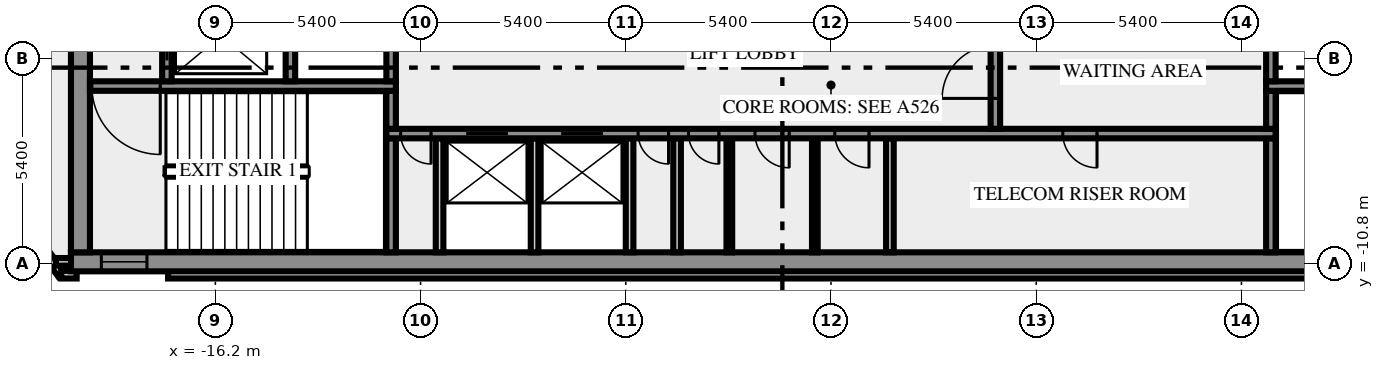
"""IFC4 building model, lengths in metres.
Left out: names, types, materials, properties, quantities, classifications, styles, units other than length and angle.
Written with IfcOpenShell. Run it as: python <this file> out.ifc"""

import sys

from ifc_helpers import new_model, si_unit, direction, frame, frame_2d, origin, place, context, subcontext, project, spatial, rectangle, extrude, element, fill, save


model = new_model("IFC4")
c1 = context("Model", 3, precision=1e-05, world=origin(), true_north=direction((0.0, 1.0)))
c2 = subcontext(c1, "Body", "Model", "MODEL_VIEW")
j1 = project(units=[si_unit("LENGTHUNIT", "METRE"), si_unit("PLANEANGLEUNIT", "RADIAN")], contexts=[c1])
p1 = place(None, origin())
s1 = spatial("IfcSite", under=j1, at=p1, CompositionType="ELEMENT")
p2 = place(p1, origin())
s2 = spatial("IfcBuilding", under=s1, at=p2, CompositionType="ELEMENT")
p3 = place(p2, frame((0.0, 0.0, 343.0)))
s3 = spatial("IfcBuildingStorey", under=s2, at=p3, CompositionType="ELEMENT", Elevation=343.0)
p4 = place(p3, frame((-21.833, -8.909, 0.0), z_axis=(0.0, 0.0, 1.0), x_axis=(0.587766567315, -0.809030569476, 0.0)))
e1 = element("IfcWall", 1, at=p4, inside=s3, PredefinedType="SOLIDWALL", context=c2, shape_type="SweptSolid", body=[
    extrude(rectangle(XDim=2.688, YDim=0.2, at=frame_2d((1.344, 0.0))), origin(), (0.0, 0.0, 1.0), 3.65),
])
p5 = place(p3, frame((-20.256, -11.088, 0.0), z_axis=(0.0, 0.0, 1.0), x_axis=(1.0, 0.0, 0.0)))
e2 = element("IfcWall", 2, at=p5, inside=s3, PredefinedType="SOLIDWALL", context=c2, shape_type="SweptSolid", body=[
    extrude(rectangle(XDim=0.406, YDim=0.2, at=frame_2d((0.203, 0.0))), origin(), (0.0, 0.0, 1.0), 3.65),
])
p6 = place(p3, frame((-17.444, -11.088, 0.0), z_axis=(0.0, 0.0, 1.0), x_axis=(1.0, 0.0, 0.0)))
e3 = element("IfcWall", 3, at=p6, inside=s3, PredefinedType="SOLIDWALL", context=c2, shape_type="SweptSolid", body=[
    extrude(rectangle(XDim=34.888, YDim=0.2, at=frame_2d((17.444, 0.0))), origin(), (0.0, 0.0, 1.0), 3.65),
])
p7 = place(p3, frame((-19.98, -10.75, 0.0), z_axis=(0.0, 0.0, 1.0), x_axis=(-1.0, 0.0, 0.0)))
e4 = element("IfcWall", 4, at=p7, inside=s3, PredefinedType="SOLIDWALL", context=c2, shape_type="SweptSolid", body=[
    extrude(rectangle(XDim=0.417, YDim=0.2, at=frame_2d((0.208, 0.0))), origin(), (0.0, 0.0, 1.0), 3.65),
])
p8 = place(p3, frame((-20.0, -10.75, 0.0), z_axis=(0.0, 0.0, 1.0), x_axis=(1.0, 0.0, 0.0)))
e5 = element("IfcWall", 5, at=p8, inside=s3, PredefinedType="SHEAR", context=c2, shape_type="SweptSolid", body=[
    extrude(rectangle(XDim=40.0, YDim=0.5, at=frame_2d((20.0, 0.0))), origin(), (0.0, 0.0, 1.0), 3.65),
])
p9 = place(p8, frame((0.8, 0.0, 1.0)))
e6 = element("IfcOpeningElement", 6, at=p9, cuts=e5, PredefinedType="OPENING", context=c2, shape_type="SweptSolid", body=[
    extrude(rectangle(XDim=1.2, YDim=1.2, at=frame_2d((0.6, 0.6))), frame((0.0, 0.26, 0.0), z_axis=(0.0, -1.0, 0.0), x_axis=(1.0, 0.0, 0.0)), (0.0, 0.0, 1.0), 0.52),
])
p10 = place(p8, frame((38.0, 0.0, 1.0)))
e7 = element("IfcOpeningElement", 7, at=p10, cuts=e5, PredefinedType="OPENING", context=c2, shape_type="SweptSolid", body=[
    extrude(rectangle(XDim=1.2, YDim=1.2, at=frame_2d((0.6, 0.6))), frame((0.0, 0.26, 0.0), z_axis=(0.0, -1.0, 0.0), x_axis=(1.0, 0.0, 0.0)), (0.0, 0.0, 1.0), 0.52),
])
p11 = place(p3, frame((-19.75, -10.5, 0.0), z_axis=(0.0, 0.0, 1.0), x_axis=(0.0, 1.0, 0.0)))
e8 = element("IfcWall", 8, at=p11, inside=s3, PredefinedType="SHEAR", context=c2, shape_type="SweptSolid", body=[
    extrude(rectangle(XDim=8.8, YDim=0.5, at=frame_2d((4.4, 0.0))), origin(), (0.0, 0.0, 1.0), 3.65),
])
p12 = place(p3, frame((-11.575, -10.5, 0.0), z_axis=(0.0, 0.0, 1.0), x_axis=(0.0, 1.0, 0.0)))
e9 = element("IfcWall", 9, at=p12, inside=s3, PredefinedType="SHEAR", context=c2, shape_type="SweptSolid", body=[
    extrude(rectangle(XDim=3.0, YDim=0.25, at=frame_2d((1.5, 0.0))), origin(), (0.0, 0.0, 1.0), 3.65),
])
for number, where, z_axis, x_axis in (
    (10, (-10.3, -10.5, 0.0), (0.0, 0.0, 1.0), (0.0, 1.0, 0.0)),
    (11, (-7.8, -10.5, 0.0), (0.0, 0.0, 1.0), (0.0, 1.0, 0.0)),
    (12, (-5.3, -10.5, 0.0), (0.0, 0.0, 1.0), (0.0, 1.0, 0.0)),
    (13, (-4.05, -10.5, 0.0), (0.0, 0.0, 1.0), (0.0, 1.0, 0.0)),
):
    element("IfcWall", number, at=place(p3, frame(where, z_axis=z_axis, x_axis=x_axis)), inside=s3, PredefinedType="SOLIDWALL", context=c2, shape_type="SweptSolid", body=[
        extrude(rectangle(XDim=3.0, YDim=0.2, at=frame_2d((1.5, 0.0))), origin(), (0.0, 0.0, 1.0), 3.65),
    ])
for number, where, z_axis, x_axis in (
    (14, (-2.675, -10.5, 0.0), (0.0, 0.0, 1.0), (0.0, 1.0, 0.0)),
    (15, (-0.425, -10.5, 0.0), (0.0, 0.0, 1.0), (0.0, 1.0, 0.0)),
):
    element("IfcWall", number, at=place(p3, frame(where, z_axis=z_axis, x_axis=x_axis)), inside=s3, PredefinedType="PARTITIONING", context=c2, shape_type="SweptSolid", body=[
        extrude(rectangle(XDim=3.0, YDim=0.15, at=frame_2d((1.5, 0.0))), origin(), (0.0, 0.0, 1.0), 3.65),
    ])
p13 = place(p3, frame((1.55, -10.5, 0.0), z_axis=(0.0, 0.0, 1.0), x_axis=(0.0, 1.0, 0.0)))
e16 = element("IfcWall", 16, at=p13, inside=s3, PredefinedType="SOLIDWALL", context=c2, shape_type="SweptSolid", body=[
    extrude(rectangle(XDim=3.0, YDim=0.2, at=frame_2d((1.5, 0.0))), origin(), (0.0, 0.0, 1.0), 3.65),
])
p14 = place(p3, frame((11.575, -10.5, 0.0), z_axis=(0.0, 0.0, 1.0), x_axis=(0.0, 1.0, 0.0)))
e17 = element("IfcWall", 17, at=p14, inside=s3, PredefinedType="SHEAR", context=c2, shape_type="SweptSolid", body=[
    extrude(rectangle(XDim=3.0, YDim=0.25, at=frame_2d((1.5, 0.0))), origin(), (0.0, 0.0, 1.0), 3.65),
])
p15 = place(p3, frame((11.7, -7.375, 0.0), z_axis=(0.0, 0.0, 1.0), x_axis=(-1.0, 0.0, 0.0)))
e18 = element("IfcWall", 18, at=p15, inside=s3, PredefinedType="SHEAR", context=c2, shape_type="SweptSolid", body=[
    extrude(rectangle(XDim=23.4, YDim=0.25, at=frame_2d((11.7, 0.0))), origin(), (0.0, 0.0, 1.0), 3.65),
])
p16 = place(p15, frame((22.225, 0.0, 0.0)))
e19 = element("IfcOpeningElement", 19, at=p16, cuts=e18, PredefinedType="OPENING", context=c2, shape_type="SweptSolid", body=[
    extrude(rectangle(XDim=0.8, YDim=2.1, at=frame_2d((0.4, 1.05))), frame((0.0, 0.135, 0.0), z_axis=(0.0, -1.0, 0.0), x_axis=(1.0, 0.0, 0.0)), (0.0, 0.0, 1.0), 0.27),
])
p17 = place(p15, frame((20.2, 0.0, 0.0)))
e20 = element("IfcOpeningElement", 20, at=p17, cuts=e18, PredefinedType="OPENING", context=c2, shape_type="SweptSolid", body=[
    extrude(rectangle(XDim=1.1, YDim=2.1, at=frame_2d((0.55, 1.05))), frame((0.0, 0.135, 0.0), z_axis=(0.0, -1.0, 0.0), x_axis=(1.0, 0.0, 0.0)), (0.0, 0.0, 1.0), 0.27),
])
p18 = place(p15, frame((17.7, 0.0, 0.0)))
e21 = element("IfcOpeningElement", 21, at=p18, cuts=e18, PredefinedType="OPENING", context=c2, shape_type="SweptSolid", body=[
    extrude(rectangle(XDim=1.1, YDim=2.1, at=frame_2d((0.55, 1.05))), frame((0.0, 0.135, 0.0), z_axis=(0.0, -1.0, 0.0), x_axis=(1.0, 0.0, 0.0)), (0.0, 0.0, 1.0), 0.27),
])
p19 = place(p15, frame((15.975, 0.0, 0.0)))
e22 = element("IfcOpeningElement", 22, at=p19, cuts=e18, PredefinedType="OPENING", context=c2, shape_type="SweptSolid", body=[
    extrude(rectangle(XDim=0.8, YDim=2.1, at=frame_2d((0.4, 1.05))), frame((0.0, 0.135, 0.0), z_axis=(0.0, -1.0, 0.0), x_axis=(1.0, 0.0, 0.0)), (0.0, 0.0, 1.0), 0.27),
])
p20 = place(p15, frame((14.65, 0.0, 0.0)))
e23 = element("IfcOpeningElement", 23, at=p20, cuts=e18, PredefinedType="OPENING", context=c2, shape_type="SweptSolid", body=[
    extrude(rectangle(XDim=0.8, YDim=2.1, at=frame_2d((0.4, 1.05))), frame((0.0, 0.135, 0.0), z_axis=(0.0, -1.0, 0.0), x_axis=(1.0, 0.0, 0.0)), (0.0, 0.0, 1.0), 0.27),
])
p21 = place(p15, frame((12.8, 0.0, 0.0)))
e24 = element("IfcOpeningElement", 24, at=p21, cuts=e18, PredefinedType="OPENING", context=c2, shape_type="SweptSolid", body=[
    extrude(rectangle(XDim=0.9, YDim=2.1, at=frame_2d((0.45, 1.05))), frame((0.0, 0.135, 0.0), z_axis=(0.0, -1.0, 0.0), x_axis=(1.0, 0.0, 0.0)), (0.0, 0.0, 1.0), 0.27),
])
p22 = place(p15, frame((10.7, 0.0, 0.0)))
e25 = element("IfcOpeningElement", 25, at=p22, cuts=e18, PredefinedType="OPENING", context=c2, shape_type="SweptSolid", body=[
    extrude(rectangle(XDim=0.9, YDim=2.1, at=frame_2d((0.45, 1.05))), frame((0.0, 0.135, 0.0), z_axis=(0.0, -1.0, 0.0), x_axis=(1.0, 0.0, 0.0)), (0.0, 0.0, 1.0), 0.27),
])
p23 = place(p15, frame((4.7, 0.0, 0.0)))
e26 = element("IfcOpeningElement", 26, at=p23, cuts=e18, PredefinedType="OPENING", context=c2, shape_type="SweptSolid", body=[
    extrude(rectangle(XDim=0.9, YDim=2.1, at=frame_2d((0.45, 1.05))), frame((0.0, 0.135, 0.0), z_axis=(0.0, -1.0, 0.0), x_axis=(1.0, 0.0, 0.0)), (0.0, 0.0, 1.0), 0.27),
])
p24 = place(p3, frame((-11.575, -7.25, 0.0), z_axis=(0.0, 0.0, 1.0), x_axis=(0.0, 1.0, 0.0)))
e27 = element("IfcWall", 27, at=p24, inside=s3, PredefinedType="SHEAR", context=c2, shape_type="SweptSolid", body=[
    extrude(rectangle(XDim=1.0, YDim=0.25, at=frame_2d((0.5, 0.0))), origin(), (0.0, 0.0, 1.0), 3.65),
])
p25 = place(p3, frame((4.325, -7.25, 0.0), z_axis=(0.0, 0.0, 1.0), x_axis=(0.0, 1.0, 0.0)))
e28 = element("IfcWall", 28, at=p25, inside=s3, PredefinedType="SHEAR", context=c2, shape_type="SweptSolid", body=[
    extrude(rectangle(XDim=3.0, YDim=0.25, at=frame_2d((1.5, 0.0))), origin(), (0.0, 0.0, 1.0), 3.65),
])
p26 = place(p25, frame((0.8, 0.0, 0.0)))
e29 = element("IfcOpeningElement", 29, at=p26, cuts=e28, PredefinedType="OPENING", context=c2, shape_type="SweptSolid", body=[
    extrude(rectangle(XDim=1.4, YDim=2.1, at=frame_2d((0.7, 1.05))), frame((0.0, 0.135, 0.0), z_axis=(0.0, -1.0, 0.0), x_axis=(1.0, 0.0, 0.0)), (0.0, 0.0, 1.0), 0.27),
])
p27 = place(p3, frame((11.575, -7.25, 0.0), z_axis=(0.0, 0.0, 1.0), x_axis=(0.0, 1.0, 0.0)))
e30 = element("IfcWall", 30, at=p27, inside=s3, PredefinedType="SHEAR", context=c2, shape_type="SweptSolid", body=[
    extrude(rectangle(XDim=1.0, YDim=0.25, at=frame_2d((0.5, 0.0))), origin(), (0.0, 0.0, 1.0), 3.65),
])
p28 = place(p3, frame((-11.45, -6.125, 0.0), z_axis=(0.0, 0.0, 1.0), x_axis=(-1.0, 0.0, 0.0)))
e31 = element("IfcWall", 31, at=p28, inside=s3, PredefinedType="SHEAR", context=c2, shape_type="SweptSolid", body=[
    extrude(rectangle(XDim=8.05, YDim=0.25, at=frame_2d((4.025, 0.0))), origin(), (0.0, 0.0, 1.0), 3.65),
])
p29 = place(p28, frame((6.2, 0.0, 0.0)))
e32 = element("IfcOpeningElement", 32, at=p29, cuts=e31, PredefinedType="OPENING", context=c2, shape_type="SweptSolid", body=[
    extrude(rectangle(XDim=1.8, YDim=2.1, at=frame_2d((0.9, 1.05))), frame((0.0, 0.135, 0.0), z_axis=(0.0, -1.0, 0.0), x_axis=(1.0, 0.0, 0.0)), (0.0, 0.0, 1.0), 0.27),
])
p30 = place(p3, frame((19.5, -6.125, 0.0), z_axis=(0.0, 0.0, 1.0), x_axis=(-1.0, 0.0, 0.0)))
e33 = element("IfcWall", 33, at=p30, inside=s3, PredefinedType="SHEAR", context=c2, shape_type="SweptSolid", body=[
    extrude(rectangle(XDim=8.05, YDim=0.25, at=frame_2d((4.025, 0.0))), origin(), (0.0, 0.0, 1.0), 3.65),
])
p31 = place(p30, frame((0.05, 0.0, 0.0)))
e34 = element("IfcOpeningElement", 34, at=p31, cuts=e33, PredefinedType="OPENING", context=c2, shape_type="SweptSolid", body=[
    extrude(rectangle(XDim=1.8, YDim=2.1, at=frame_2d((0.9, 1.05))), frame((0.0, 0.135, 0.0), z_axis=(0.0, -1.0, 0.0), x_axis=(1.0, 0.0, 0.0)), (0.0, 0.0, 1.0), 0.27),
])
p32 = place(p3, frame((-17.475, -6.0, 0.0), z_axis=(0.0, 0.0, 1.0), x_axis=(0.0, 1.0, 0.0)))
e35 = element("IfcWall", 35, at=p32, inside=s3, PredefinedType="SHEAR", context=c2, shape_type="SweptSolid", body=[
    extrude(rectangle(XDim=4.3, YDim=0.25, at=frame_2d((2.15, 0.0))), origin(), (0.0, 0.0, 1.0), 3.65),
])
p33 = place(p32, frame((0.55, 0.0, 0.0)))
e36 = element("IfcOpeningElement", 36, at=p33, cuts=e35, PredefinedType="OPENING", context=c2, shape_type="SweptSolid", body=[
    extrude(rectangle(XDim=1.3, YDim=2.1, at=frame_2d((0.65, 1.05))), frame((0.0, 0.135, 0.0), z_axis=(0.0, -1.0, 0.0), x_axis=(1.0, 0.0, 0.0)), (0.0, 0.0, 1.0), 0.27),
])
p34 = place(p3, frame((-14.225, -6.0, 0.0), z_axis=(0.0, 0.0, 1.0), x_axis=(0.0, 1.0, 0.0)))
e37 = element("IfcWall", 37, at=p34, inside=s3, PredefinedType="SHEAR", context=c2, shape_type="SweptSolid", body=[
    extrude(rectangle(XDim=4.3, YDim=0.25, at=frame_2d((2.15, 0.0))), origin(), (0.0, 0.0, 1.0), 3.65),
])
for number, where, z_axis, x_axis in (
    (38, (-11.575, -6.0, 0.0), (0.0, 0.0, 1.0), (0.0, 1.0, 0.0)),
    (39, (11.575, -6.0, 0.0), (0.0, 0.0, 1.0), (0.0, 1.0, 0.0)),
):
    element("IfcWall", number, at=place(p3, frame(where, z_axis=z_axis, x_axis=x_axis)), inside=s3, PredefinedType="SHEAR", context=c2, shape_type="SweptSolid", body=[
        extrude(rectangle(XDim=1.75, YDim=0.25, at=frame_2d((0.875, 0.0))), origin(), (0.0, 0.0, 1.0), 3.65),
    ])
p35 = place(p9, origin())
e40 = element("IfcWindow", 40, at=p35, inside=s3, PartitioningType="SINGLE_PANEL", PredefinedType="WINDOW", context=c2, shape_type="SweptSolid", body=[
    extrude(rectangle(XDim=1.2, YDim=1.2, at=frame_2d((0.6, 0.6))), frame((0.0, 0.03, 0.0), z_axis=(0.0, -1.0, 0.0), x_axis=(1.0, 0.0, 0.0)), (0.0, 0.0, 1.0), 0.06),
])
fill(e6, e40)
p36 = place(p16, origin())
e41 = element("IfcDoor", 41, at=p36, inside=s3, OperationType="SINGLE_SWING_RIGHT", PredefinedType="DOOR", context=c2, shape_type="SweptSolid", body=[
    extrude(rectangle(XDim=0.8, YDim=2.1, at=frame_2d((0.4, 1.05))), frame((0.0, 0.025, 0.0), z_axis=(0.0, -1.0, 0.0), x_axis=(1.0, 0.0, 0.0)), (0.0, 0.0, 1.0), 0.05),
])
fill(e19, e41)
p37 = place(p17, origin())
e42 = element("IfcDoor", 42, at=p37, inside=s3, OperationType="DOUBLE_DOOR_SLIDING", PredefinedType="DOOR", context=c2, shape_type="SweptSolid", body=[
    extrude(rectangle(XDim=1.1, YDim=2.1, at=frame_2d((0.55, 1.05))), frame((0.0, 0.025, 0.0), z_axis=(0.0, -1.0, 0.0), x_axis=(1.0, 0.0, 0.0)), (0.0, 0.0, 1.0), 0.05),
])
fill(e20, e42)
p38 = place(p18, origin())
e43 = element("IfcDoor", 43, at=p38, inside=s3, OperationType="DOUBLE_DOOR_SLIDING", PredefinedType="DOOR", context=c2, shape_type="SweptSolid", body=[
    extrude(rectangle(XDim=1.1, YDim=2.1, at=frame_2d((0.55, 1.05))), frame((0.0, 0.025, 0.0), z_axis=(0.0, -1.0, 0.0), x_axis=(1.0, 0.0, 0.0)), (0.0, 0.0, 1.0), 0.05),
])
fill(e21, e43)
p39 = place(p19, origin())
e44 = element("IfcDoor", 44, at=p39, inside=s3, OperationType="SINGLE_SWING_RIGHT", PredefinedType="DOOR", context=c2, shape_type="SweptSolid", body=[
    extrude(rectangle(XDim=0.8, YDim=2.1, at=frame_2d((0.4, 1.05))), frame((0.0, 0.025, 0.0), z_axis=(0.0, -1.0, 0.0), x_axis=(1.0, 0.0, 0.0)), (0.0, 0.0, 1.0), 0.05),
])
fill(e22, e44)
p40 = place(p20, origin())
e45 = element("IfcDoor", 45, at=p40, inside=s3, OperationType="SINGLE_SWING_RIGHT", PredefinedType="DOOR", context=c2, shape_type="SweptSolid", body=[
    extrude(rectangle(XDim=0.8, YDim=2.1, at=frame_2d((0.4, 1.05))), frame((0.0, 0.025, 0.0), z_axis=(0.0, -1.0, 0.0), x_axis=(1.0, 0.0, 0.0)), (0.0, 0.0, 1.0), 0.05),
])
fill(e23, e45)
p41 = place(p21, origin())
e46 = element("IfcDoor", 46, at=p41, inside=s3, OperationType="SINGLE_SWING_RIGHT", PredefinedType="DOOR", context=c2, shape_type="SweptSolid", body=[
    extrude(rectangle(XDim=0.9, YDim=2.1, at=frame_2d((0.45, 1.05))), frame((0.0, 0.025, 0.0), z_axis=(0.0, -1.0, 0.0), x_axis=(1.0, 0.0, 0.0)), (0.0, 0.0, 1.0), 0.05),
])
fill(e24, e46)
p42 = place(p22, origin())
e47 = element("IfcDoor", 47, at=p42, inside=s3, OperationType="SINGLE_SWING_LEFT", PredefinedType="DOOR", context=c2, shape_type="SweptSolid", body=[
    extrude(rectangle(XDim=0.9, YDim=2.1, at=frame_2d((0.45, 1.05))), frame((0.0, 0.025, 0.0), z_axis=(0.0, -1.0, 0.0), x_axis=(1.0, 0.0, 0.0)), (0.0, 0.0, 1.0), 0.05),
])
fill(e25, e47)
p43 = place(p23, origin())
e48 = element("IfcDoor", 48, at=p43, inside=s3, OperationType="SINGLE_SWING_LEFT", PredefinedType="DOOR", context=c2, shape_type="SweptSolid", body=[
    extrude(rectangle(XDim=0.9, YDim=2.1, at=frame_2d((0.45, 1.05))), frame((0.0, 0.025, 0.0), z_axis=(0.0, -1.0, 0.0), x_axis=(1.0, 0.0, 0.0)), (0.0, 0.0, 1.0), 0.05),
])
fill(e26, e48)
p44 = place(p26, origin())
e49 = element("IfcDoor", 49, at=p44, inside=s3, OperationType="DOUBLE_DOOR_SINGLE_SWING", PredefinedType="DOOR", context=c2, shape_type="SweptSolid", body=[
    extrude(rectangle(XDim=1.4, YDim=2.1, at=frame_2d((0.7, 1.05))), frame((0.0, 0.025, 0.0), z_axis=(0.0, -1.0, 0.0), x_axis=(1.0, 0.0, 0.0)), (0.0, 0.0, 1.0), 0.05),
])
fill(e29, e49)
p45 = place(p29, origin())
e50 = element("IfcDoor", 50, at=p45, inside=s3, OperationType="DOUBLE_DOOR_SINGLE_SWING", PredefinedType="DOOR", context=c2, shape_type="SweptSolid", body=[
    extrude(rectangle(XDim=1.8, YDim=2.1, at=frame_2d((0.9, 1.05))), frame((0.0, 0.025, 0.0), z_axis=(0.0, -1.0, 0.0), x_axis=(1.0, 0.0, 0.0)), (0.0, 0.0, 1.0), 0.05),
])
fill(e32, e50)
p46 = place(p33, origin())
e51 = element("IfcDoor", 51, at=p46, inside=s3, OperationType="DOUBLE_DOOR_SLIDING", PredefinedType="DOOR", context=c2, shape_type="SweptSolid", body=[
    extrude(rectangle(XDim=1.3, YDim=2.1, at=frame_2d((0.65, 1.05))), frame((0.0, 0.025, 0.0), z_axis=(0.0, -1.0, 0.0), x_axis=(1.0, 0.0, 0.0)), (0.0, 0.0, 1.0), 0.05),
])
fill(e36, e51)
save(model, sys.argv[1])
